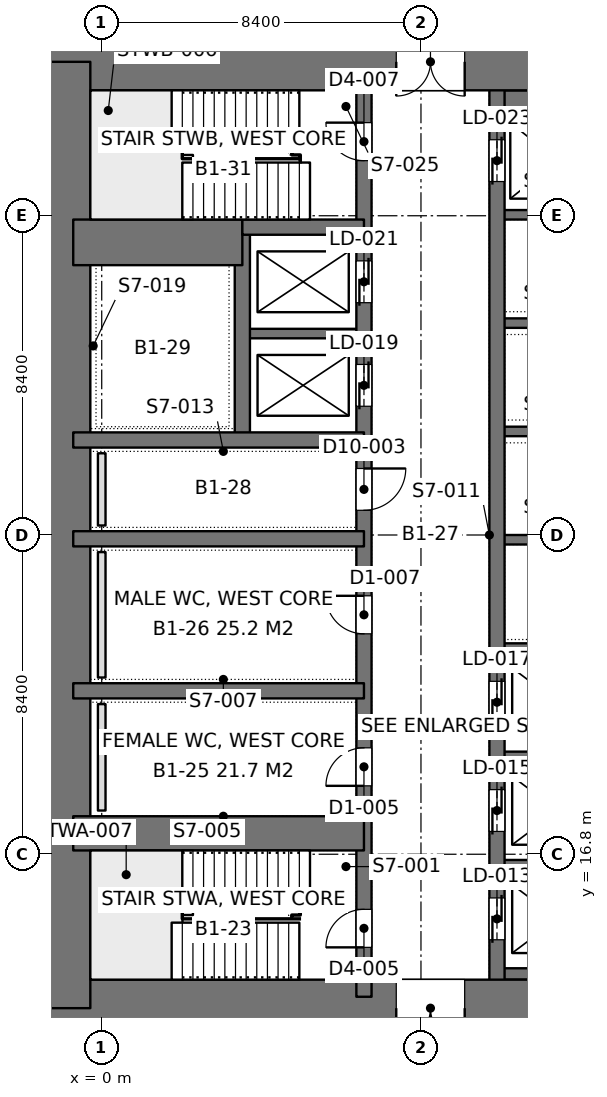
"""IFC4 building model, lengths in metres.
Left out: names, types, materials, properties, quantities, classifications, styles, units other than length and angle.
Written with IfcOpenShell. Run it as: python <this file> out.ifc"""

import sys

from ifc_helpers import new_model, si_unit, direction, frame, frame_2d, origin, place, context, subcontext, project, spatial, rectangle, extrude, element, fill, save


model = new_model("IFC4")
c1 = context("Model", 3, precision=1e-05, world=origin(), true_north=direction((0.0, 1.0)))
c2 = subcontext(c1, "Body", "Model", "MODEL_VIEW")
j1 = project(units=[si_unit("LENGTHUNIT", "METRE"), si_unit("PLANEANGLEUNIT", "RADIAN")], contexts=[c1])
p1 = place(None, origin())
s1 = spatial("IfcSite", under=j1, at=p1, CompositionType="ELEMENT")
p2 = place(p1, origin())
s2 = spatial("IfcBuilding", under=s1, at=p2, CompositionType="ELEMENT")
p3 = place(p2, frame((0.0, 0.0, -4.2)))
s3 = spatial("IfcBuildingStorey", under=s2, at=p3, CompositionType="ELEMENT", Elevation=-4.2)
p4 = place(p3, frame((-1.8, 12.75, 0.0), z_axis=(0.0, 0.0, 1.0), x_axis=(1.0, 0.0, 0.0)))
e1 = element("IfcWall", 1, at=p4, inside=s3, PredefinedType="SHEAR", context=c2, shape_type="SweptSolid", body=[
    extrude(rectangle(XDim=19.2, YDim=1.5, at=frame_2d((9.6, 0.0))), origin(), (0.0, 0.0, 1.0), 4.2),
])
p5 = place(p4, frame((9.55, 0.0, 0.0)))
e2 = element("IfcOpeningElement", 2, at=p5, cuts=e1, PredefinedType="OPENING", context=c2, shape_type="SweptSolid", body=[
    extrude(rectangle(XDim=1.8, YDim=2.4, at=frame_2d((0.9, 1.2))), frame((0.0, 0.76, 0.0), z_axis=(0.0, -1.0, 0.0), x_axis=(1.0, 0.0, 0.0)), (0.0, 0.0, 1.0), 1.52),
])
p6 = place(p3, frame((-1.8, 37.65, 0.0), z_axis=(0.0, 0.0, 1.0), x_axis=(1.0, 0.0, 0.0)))
e3 = element("IfcWall", 3, at=p6, inside=s3, PredefinedType="SHEAR", context=c2, shape_type="SweptSolid", body=[
    extrude(rectangle(XDim=19.2, YDim=1.5, at=frame_2d((9.6, 0.0))), origin(), (0.0, 0.0, 1.0), 4.2),
])
p7 = place(p6, frame((9.55, 0.0, 0.0)))
e4 = element("IfcOpeningElement", 4, at=p7, cuts=e3, PredefinedType="OPENING", context=c2, shape_type="SweptSolid", body=[
    extrude(rectangle(XDim=1.8, YDim=2.4, at=frame_2d((0.9, 1.2))), frame((0.0, 0.76, 0.0), z_axis=(0.0, -1.0, 0.0), x_axis=(1.0, 0.0, 0.0)), (0.0, 0.0, 1.0), 1.52),
])
p8 = place(p3, frame((-1.05, 12.75, 0.0), z_axis=(0.0, 0.0, 1.0), x_axis=(0.0, 1.0, 0.0)))
e5 = element("IfcWall", 5, at=p8, inside=s3, PredefinedType="SHEAR", context=c2, shape_type="SweptSolid", body=[
    extrude(rectangle(XDim=24.9, YDim=1.5, at=frame_2d((12.45, 0.0))), origin(), (0.0, 0.0, 1.0), 4.2),
])
p9 = place(p3, frame((6.9, 13.05, 0.0), z_axis=(0.0, 0.0, 1.0), x_axis=(0.0, 1.0, 0.0)))
e6 = element("IfcWall", 6, at=p9, inside=s3, PredefinedType="SHEAR", context=c2, shape_type="SweptSolid", body=[
    extrude(rectangle(XDim=24.3, YDim=0.4, at=frame_2d((12.15, 0.0))), origin(), (0.0, 0.0, 1.0), 4.2),
])
p10 = place(p9, frame((1.3, 0.0, 0.0)))
e7 = element("IfcOpeningElement", 7, at=p10, cuts=e6, PredefinedType="OPENING", context=c2, shape_type="SweptSolid", body=[
    extrude(rectangle(XDim=1.0, YDim=2.2, at=frame_2d((0.5, 1.1))), frame((0.0, 0.21, 0.0), z_axis=(0.0, -1.0, 0.0), x_axis=(1.0, 0.0, 0.0)), (0.0, 0.0, 1.0), 0.42),
])
p11 = place(p9, frame((22.0, 0.0, 0.0)))
e8 = element("IfcOpeningElement", 8, at=p11, cuts=e6, PredefinedType="OPENING", context=c2, shape_type="SweptSolid", body=[
    extrude(rectangle(XDim=1.0, YDim=2.2, at=frame_2d((0.5, 1.1))), frame((0.0, 0.21, 0.0), z_axis=(0.0, -1.0, 0.0), x_axis=(1.0, 0.0, 0.0)), (0.0, 0.0, 1.0), 0.42),
])
p12 = place(p9, frame((5.55, 0.0, 0.0)))
e9 = element("IfcOpeningElement", 9, at=p12, cuts=e6, PredefinedType="OPENING", context=c2, shape_type="SweptSolid", body=[
    extrude(rectangle(XDim=1.0, YDim=2.2, at=frame_2d((0.5, 1.1))), frame((0.0, 0.21, 0.0), z_axis=(0.0, -1.0, 0.0), x_axis=(1.0, 0.0, 0.0)), (0.0, 0.0, 1.0), 0.42),
])
p13 = place(p9, frame((9.55, 0.0, 0.0)))
e10 = element("IfcOpeningElement", 10, at=p13, cuts=e6, PredefinedType="OPENING", context=c2, shape_type="SweptSolid", body=[
    extrude(rectangle(XDim=1.0, YDim=2.2, at=frame_2d((0.5, 1.1))), frame((0.0, 0.21, 0.0), z_axis=(0.0, -1.0, 0.0), x_axis=(1.0, 0.0, 0.0)), (0.0, 0.0, 1.0), 0.42),
])
p14 = place(p9, frame((12.8, 0.0, 0.0)))
e11 = element("IfcOpeningElement", 11, at=p14, cuts=e6, PredefinedType="OPENING", context=c2, shape_type="SweptSolid", body=[
    extrude(rectangle(XDim=1.1, YDim=2.2, at=frame_2d((0.55, 1.1))), frame((0.0, 0.21, 0.0), z_axis=(0.0, -1.0, 0.0), x_axis=(1.0, 0.0, 0.0)), (0.0, 0.0, 1.0), 0.42),
])
p15 = place(p9, frame((15.538, 0.0, 0.0)))
e12 = element("IfcOpeningElement", 12, at=p15, cuts=e6, PredefinedType="OPENING", context=c2, shape_type="SweptSolid", body=[
    extrude(rectangle(XDim=1.1, YDim=2.2, at=frame_2d((0.55, 1.1))), frame((0.0, 0.21, 0.0), z_axis=(0.0, -1.0, 0.0), x_axis=(1.0, 0.0, 0.0)), (0.0, 0.0, 1.0), 0.42),
])
p16 = place(p9, frame((18.262, 0.0, 0.0)))
e13 = element("IfcOpeningElement", 13, at=p16, cuts=e6, PredefinedType="OPENING", context=c2, shape_type="SweptSolid", body=[
    extrude(rectangle(XDim=1.1, YDim=2.2, at=frame_2d((0.55, 1.1))), frame((0.0, 0.21, 0.0), z_axis=(0.0, -1.0, 0.0), x_axis=(1.0, 0.0, 0.0)), (0.0, 0.0, 1.0), 0.42),
])
p17 = place(p3, frame((10.4, 13.05, 0.0), z_axis=(0.0, 0.0, 1.0), x_axis=(0.0, 1.0, 0.0)))
e14 = element("IfcWall", 14, at=p17, inside=s3, PredefinedType="SHEAR", context=c2, shape_type="SweptSolid", body=[
    extrude(rectangle(XDim=24.3, YDim=0.4, at=frame_2d((12.15, 0.0))), origin(), (0.0, 0.0, 1.0), 4.2),
])
p18 = place(p17, frame((1.5, 0.0, 0.0)))
e15 = element("IfcOpeningElement", 15, at=p18, cuts=e14, PredefinedType="OPENING", context=c2, shape_type="SweptSolid", body=[
    extrude(rectangle(XDim=1.1, YDim=2.2, at=frame_2d((0.55, 1.1))), frame((0.0, 0.21, 0.0), z_axis=(0.0, -1.0, 0.0), x_axis=(1.0, 0.0, 0.0)), (0.0, 0.0, 1.0), 0.42),
])
p19 = place(p17, frame((4.35, 0.0, 0.0)))
e16 = element("IfcOpeningElement", 16, at=p19, cuts=e14, PredefinedType="OPENING", context=c2, shape_type="SweptSolid", body=[
    extrude(rectangle(XDim=1.1, YDim=2.2, at=frame_2d((0.55, 1.1))), frame((0.0, 0.21, 0.0), z_axis=(0.0, -1.0, 0.0), x_axis=(1.0, 0.0, 0.0)), (0.0, 0.0, 1.0), 0.42),
])
p20 = place(p17, frame((7.2, 0.0, 0.0)))
e17 = element("IfcOpeningElement", 17, at=p20, cuts=e14, PredefinedType="OPENING", context=c2, shape_type="SweptSolid", body=[
    extrude(rectangle(XDim=1.1, YDim=2.2, at=frame_2d((0.55, 1.1))), frame((0.0, 0.21, 0.0), z_axis=(0.0, -1.0, 0.0), x_axis=(1.0, 0.0, 0.0)), (0.0, 0.0, 1.0), 0.42),
])
p21 = place(p17, frame((21.45, 0.0, 0.0)))
e18 = element("IfcOpeningElement", 18, at=p21, cuts=e14, PredefinedType="OPENING", context=c2, shape_type="SweptSolid", body=[
    extrude(rectangle(XDim=1.1, YDim=2.2, at=frame_2d((0.55, 1.1))), frame((0.0, 0.21, 0.0), z_axis=(0.0, -1.0, 0.0), x_axis=(1.0, 0.0, 0.0)), (0.0, 0.0, 1.0), 0.42),
])
p22 = place(p3, frame((-0.75, 17.35, 0.0), z_axis=(0.0, 0.0, 1.0), x_axis=(1.0, 0.0, 0.0)))
e19 = element("IfcWall", 19, at=p22, inside=s3, PredefinedType="SHEAR", context=c2, shape_type="SweptSolid", body=[
    extrude(rectangle(XDim=7.65, YDim=0.9, at=frame_2d((3.825, 0.0))), origin(), (0.0, 0.0, 1.0), 4.2),
])
for number, where, z_axis, x_axis in (
    (20, (-0.75, 21.1, 0.0), (0.0, 0.0, 1.0), (1.0, 0.0, 0.0)),
    (21, (-0.75, 25.1, 0.0), (0.0, 0.0, 1.0), (1.0, 0.0, 0.0)),
    (22, (-0.75, 27.7, 0.0), (0.0, 0.0, 1.0), (1.0, 0.0, 0.0)),
):
    element("IfcWall", number, at=place(p3, frame(where, z_axis=z_axis, x_axis=x_axis)), inside=s3, PredefinedType="SHEAR", context=c2, shape_type="SweptSolid", body=[
        extrude(rectangle(XDim=7.65, YDim=0.4, at=frame_2d((3.825, 0.0))), origin(), (0.0, 0.0, 1.0), 4.2),
    ])
p23 = place(p3, frame((-0.75, 32.9, 0.0), z_axis=(0.0, 0.0, 1.0), x_axis=(1.0, 0.0, 0.0)))
e23 = element("IfcWall", 23, at=p23, inside=s3, PredefinedType="SHEAR", context=c2, shape_type="SweptSolid", body=[
    extrude(rectangle(XDim=4.45, YDim=1.2, at=frame_2d((2.225, 0.0))), origin(), (0.0, 0.0, 1.0), 4.2),
])
p24 = place(p3, frame((3.7, 33.3, 0.0), z_axis=(0.0, 0.0, 1.0), x_axis=(1.0, 0.0, 0.0)))
e24 = element("IfcWall", 24, at=p24, inside=s3, PredefinedType="SHEAR", context=c2, shape_type="SweptSolid", body=[
    extrude(rectangle(XDim=3.2, YDim=0.4, at=frame_2d((1.6, 0.0))), origin(), (0.0, 0.0, 1.0), 4.2),
])
p25 = place(p3, frame((3.7, 27.7, 0.0), z_axis=(0.0, 0.0, 1.0), x_axis=(0.0, 1.0, 0.0)))
e25 = element("IfcWall", 25, at=p25, inside=s3, PredefinedType="SHEAR", context=c2, shape_type="SweptSolid", body=[
    extrude(rectangle(XDim=5.6, YDim=0.4, at=frame_2d((2.8, 0.0))), origin(), (0.0, 0.0, 1.0), 4.2),
])
p26 = place(p3, frame((3.7, 30.5, 0.0), z_axis=(0.0, 0.0, 1.0), x_axis=(1.0, 0.0, 0.0)))
e26 = element("IfcWall", 26, at=p26, inside=s3, PredefinedType="SHEAR", context=c2, shape_type="SweptSolid", body=[
    extrude(rectangle(XDim=3.2, YDim=0.25, at=frame_2d((1.6, 0.0))), origin(), (0.0, 0.0, 1.0), 4.2),
])
p27 = place(p3, frame((10.4, 13.65, 0.0), z_axis=(0.0, 0.0, 1.0), x_axis=(1.0, 0.0, 0.0)))
e27 = element("IfcWall", 27, at=p27, inside=s3, PredefinedType="SHEAR", context=c2, shape_type="SweptSolid", body=[
    extrude(rectangle(XDim=3.2, YDim=0.3, at=frame_2d((1.6, 0.0))), origin(), (0.0, 0.0, 1.0), 4.2),
])
for number, where, z_axis, x_axis in (
    (28, (10.4, 16.525, 0.0), (0.0, 0.0, 1.0), (1.0, 0.0, 0.0)),
    (29, (10.4, 19.375, 0.0), (0.0, 0.0, 1.0), (1.0, 0.0, 0.0)),
    (30, (10.4, 22.225, 0.0), (0.0, 0.0, 1.0), (1.0, 0.0, 0.0)),
    (31, (10.4, 25.075, 0.0), (0.0, 0.0, 1.0), (1.0, 0.0, 0.0)),
    (32, (10.4, 27.925, 0.0), (0.0, 0.0, 1.0), (1.0, 0.0, 0.0)),
    (33, (10.4, 30.775, 0.0), (0.0, 0.0, 1.0), (1.0, 0.0, 0.0)),
    (34, (10.4, 33.625, 0.0), (0.0, 0.0, 1.0), (1.0, 0.0, 0.0)),
):
    element("IfcWall", number, at=place(p3, frame(where, z_axis=z_axis, x_axis=x_axis)), inside=s3, PredefinedType="SHEAR", context=c2, shape_type="SweptSolid", body=[
        extrude(rectangle(XDim=3.2, YDim=0.25, at=frame_2d((1.6, 0.0))), origin(), (0.0, 0.0, 1.0), 4.2),
    ])
p28 = place(p3, frame((10.4, 36.625, 0.0), z_axis=(0.0, 0.0, 1.0), x_axis=(1.0, 0.0, 0.0)))
e35 = element("IfcWall", 35, at=p28, inside=s3, PredefinedType="SHEAR", context=c2, shape_type="SweptSolid", body=[
    extrude(rectangle(XDim=3.2, YDim=0.55, at=frame_2d((1.6, 0.0))), origin(), (0.0, 0.0, 1.0), 4.2),
])
p29 = place(p3, frame((-0.75, 9.049, 0.0), z_axis=(0.0, 0.0, 1.0), x_axis=(0.0, 1.0, 0.0)))
e36 = element("IfcWall", 36, at=p29, inside=s3, PredefinedType="PARTITIONING", context=c2, shape_type="SweptSolid", body=[
    extrude(rectangle(XDim=3.531, YDim=0.25, at=frame_2d((1.766, 0.0))), origin(), (0.0, 0.0, 1.0), 3.8),
])
p30 = place(p3, frame((-0.75, 37.82, 0.0), z_axis=(0.0, 0.0, 1.0), x_axis=(0.0, 1.0, 0.0)))
e37 = element("IfcWall", 37, at=p30, inside=s3, PredefinedType="PARTITIONING", context=c2, shape_type="SweptSolid", body=[
    extrude(rectangle(XDim=3.531, YDim=0.25, at=frame_2d((1.766, 0.0))), origin(), (0.0, 0.0, 1.0), 3.8),
])
p31 = place(p30, frame((1.63, 0.0, 0.0)))
e38 = element("IfcOpeningElement", 38, at=p31, cuts=e37, PredefinedType="OPENING", context=c2, shape_type="SweptSolid", body=[
    extrude(rectangle(XDim=0.9, YDim=2.2, at=frame_2d((0.45, 1.1))), frame((0.0, 0.135, 0.0), z_axis=(0.0, -1.0, 0.0), x_axis=(1.0, 0.0, 0.0)), (0.0, 0.0, 1.0), 0.27),
])
p32 = place(p3, frame((0.0, 17.95, 0.0), z_axis=(0.0, 0.0, 1.0), x_axis=(0.0, 1.0, 0.0)))
e39 = element("IfcWall", 39, at=p32, inside=s3, PredefinedType="PLUMBINGWALL", context=c2, shape_type="SweptSolid", body=[
    extrude(rectangle(XDim=2.8, YDim=0.2, at=frame_2d((1.4, 0.0))), origin(), (0.0, 0.0, 1.0), 1.2),
])
p33 = place(p3, frame((0.0, 21.45, 0.0), z_axis=(0.0, 0.0, 1.0), x_axis=(0.0, 1.0, 0.0)))
e40 = element("IfcWall", 40, at=p33, inside=s3, PredefinedType="PLUMBINGWALL", context=c2, shape_type="SweptSolid", body=[
    extrude(rectangle(XDim=3.3, YDim=0.2, at=frame_2d((1.65, 0.0))), origin(), (0.0, 0.0, 1.0), 1.2),
])
p34 = place(p3, frame((0.0, 25.45, 0.0), z_axis=(0.0, 0.0, 1.0), x_axis=(0.0, 1.0, 0.0)))
e41 = element("IfcWall", 41, at=p34, inside=s3, PredefinedType="PLUMBINGWALL", context=c2, shape_type="SweptSolid", body=[
    extrude(rectangle(XDim=1.9, YDim=0.2, at=frame_2d((0.95, 0.0))), origin(), (0.0, 0.0, 1.0), 1.2),
])
p35 = place(p5, frame((1.8, 0.0, 0.0), z_axis=(0.0, 0.0, 1.0), x_axis=(-1.0, 0.0, 0.0)))
e42 = element("IfcDoor", 42, at=p35, inside=s3, OperationType="DOUBLE_DOOR_SINGLE_SWING", PredefinedType="DOOR", context=c2, shape_type="SweptSolid", body=[
    extrude(rectangle(XDim=1.8, YDim=2.4, at=frame_2d((0.9, 1.2))), frame((0.0, 0.025, 0.0), z_axis=(0.0, -1.0, 0.0), x_axis=(1.0, 0.0, 0.0)), (0.0, 0.0, 1.0), 0.05),
])
fill(e2, e42)
p36 = place(p7, frame((1.8, 0.0, 0.0), z_axis=(0.0, 0.0, 1.0), x_axis=(-1.0, 0.0, 0.0)))
e43 = element("IfcDoor", 43, at=p36, inside=s3, OperationType="DOUBLE_DOOR_SINGLE_SWING", PredefinedType="DOOR", context=c2, shape_type="SweptSolid", body=[
    extrude(rectangle(XDim=1.8, YDim=2.4, at=frame_2d((0.9, 1.2))), frame((0.0, 0.025, 0.0), z_axis=(0.0, -1.0, 0.0), x_axis=(1.0, 0.0, 0.0)), (0.0, 0.0, 1.0), 0.05),
])
fill(e4, e43)
p37 = place(p10, origin())
e44 = element("IfcDoor", 44, at=p37, inside=s3, OperationType="SINGLE_SWING_LEFT", PredefinedType="DOOR", context=c2, shape_type="SweptSolid", body=[
    extrude(rectangle(XDim=1.0, YDim=2.2, at=frame_2d((0.5, 1.1))), frame((0.0, 0.025, 0.0), z_axis=(0.0, -1.0, 0.0), x_axis=(1.0, 0.0, 0.0)), (0.0, 0.0, 1.0), 0.05),
])
fill(e7, e44)
p38 = place(p11, origin())
e45 = element("IfcDoor", 45, at=p38, inside=s3, OperationType="SINGLE_SWING_RIGHT", PredefinedType="DOOR", context=c2, shape_type="SweptSolid", body=[
    extrude(rectangle(XDim=1.0, YDim=2.2, at=frame_2d((0.5, 1.1))), frame((0.0, 0.025, 0.0), z_axis=(0.0, -1.0, 0.0), x_axis=(1.0, 0.0, 0.0)), (0.0, 0.0, 1.0), 0.05),
])
fill(e8, e45)
p39 = place(p12, origin())
e46 = element("IfcDoor", 46, at=p39, inside=s3, OperationType="SINGLE_SWING_LEFT", PredefinedType="DOOR", context=c2, shape_type="SweptSolid", body=[
    extrude(rectangle(XDim=1.0, YDim=2.2, at=frame_2d((0.5, 1.1))), frame((0.0, 0.025, 0.0), z_axis=(0.0, -1.0, 0.0), x_axis=(1.0, 0.0, 0.0)), (0.0, 0.0, 1.0), 0.05),
])
fill(e9, e46)
p40 = place(p13, origin())
e47 = element("IfcDoor", 47, at=p40, inside=s3, OperationType="SINGLE_SWING_RIGHT", PredefinedType="DOOR", context=c2, shape_type="SweptSolid", body=[
    extrude(rectangle(XDim=1.0, YDim=2.2, at=frame_2d((0.5, 1.1))), frame((0.0, 0.025, 0.0), z_axis=(0.0, -1.0, 0.0), x_axis=(1.0, 0.0, 0.0)), (0.0, 0.0, 1.0), 0.05),
])
fill(e10, e47)
p41 = place(p14, frame((1.1, 0.0, 0.0), z_axis=(0.0, 0.0, 1.0), x_axis=(-1.0, 0.0, 0.0)))
e48 = element("IfcDoor", 48, at=p41, inside=s3, OperationType="SINGLE_SWING_LEFT", PredefinedType="DOOR", context=c2, shape_type="SweptSolid", body=[
    extrude(rectangle(XDim=1.1, YDim=2.2, at=frame_2d((0.55, 1.1))), frame((0.0, 0.025, 0.0), z_axis=(0.0, -1.0, 0.0), x_axis=(1.0, 0.0, 0.0)), (0.0, 0.0, 1.0), 0.05),
])
fill(e11, e48)
p42 = place(p18, origin())
e49 = element("IfcDoor", 49, at=p42, inside=s3, OperationType="DOUBLE_DOOR_SLIDING", PredefinedType="DOOR", context=c2, shape_type="SweptSolid", body=[
    extrude(rectangle(XDim=1.1, YDim=2.2, at=frame_2d((0.55, 1.1))), frame((0.0, 0.025, 0.0), z_axis=(0.0, -1.0, 0.0), x_axis=(1.0, 0.0, 0.0)), (0.0, 0.0, 1.0), 0.05),
])
fill(e15, e49)
p43 = place(p19, origin())
e50 = element("IfcDoor", 50, at=p43, inside=s3, OperationType="DOUBLE_DOOR_SLIDING", PredefinedType="DOOR", context=c2, shape_type="SweptSolid", body=[
    extrude(rectangle(XDim=1.1, YDim=2.2, at=frame_2d((0.55, 1.1))), frame((0.0, 0.025, 0.0), z_axis=(0.0, -1.0, 0.0), x_axis=(1.0, 0.0, 0.0)), (0.0, 0.0, 1.0), 0.05),
])
fill(e16, e50)
p44 = place(p20, origin())
e51 = element("IfcDoor", 51, at=p44, inside=s3, OperationType="DOUBLE_DOOR_SLIDING", PredefinedType="DOOR", context=c2, shape_type="SweptSolid", body=[
    extrude(rectangle(XDim=1.1, YDim=2.2, at=frame_2d((0.55, 1.1))), frame((0.0, 0.025, 0.0), z_axis=(0.0, -1.0, 0.0), x_axis=(1.0, 0.0, 0.0)), (0.0, 0.0, 1.0), 0.05),
])
fill(e17, e51)
p45 = place(p21, origin())
e52 = element("IfcDoor", 52, at=p45, inside=s3, OperationType="DOUBLE_DOOR_SLIDING", PredefinedType="DOOR", context=c2, shape_type="SweptSolid", body=[
    extrude(rectangle(XDim=1.1, YDim=2.2, at=frame_2d((0.55, 1.1))), frame((0.0, 0.025, 0.0), z_axis=(0.0, -1.0, 0.0), x_axis=(1.0, 0.0, 0.0)), (0.0, 0.0, 1.0), 0.05),
])
fill(e18, e52)
p46 = place(p15, origin())
e53 = element("IfcDoor", 53, at=p46, inside=s3, OperationType="DOUBLE_DOOR_SLIDING", PredefinedType="DOOR", context=c2, shape_type="SweptSolid", body=[
    extrude(rectangle(XDim=1.1, YDim=2.2, at=frame_2d((0.55, 1.1))), frame((0.0, 0.025, 0.0), z_axis=(0.0, -1.0, 0.0), x_axis=(1.0, 0.0, 0.0)), (0.0, 0.0, 1.0), 0.05),
])
fill(e12, e53)
p47 = place(p16, origin())
e54 = element("IfcDoor", 54, at=p47, inside=s3, OperationType="DOUBLE_DOOR_SLIDING", PredefinedType="DOOR", context=c2, shape_type="SweptSolid", body=[
    extrude(rectangle(XDim=1.1, YDim=2.2, at=frame_2d((0.55, 1.1))), frame((0.0, 0.025, 0.0), z_axis=(0.0, -1.0, 0.0), x_axis=(1.0, 0.0, 0.0)), (0.0, 0.0, 1.0), 0.05),
])
fill(e13, e54)
save(model, sys.argv[1])
